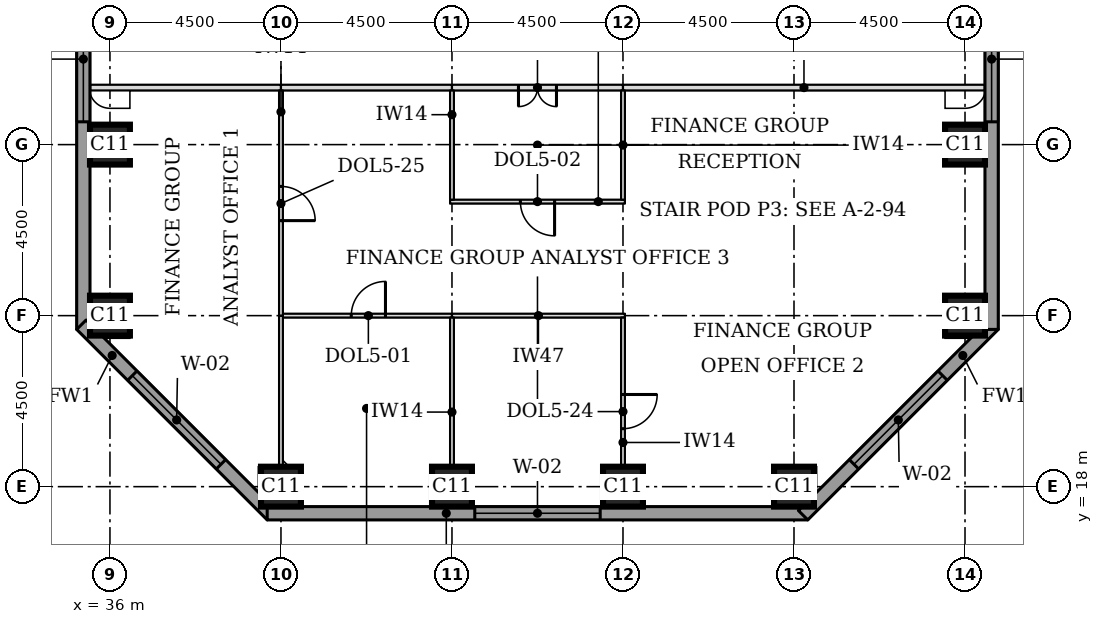
"""IFC4 building model, lengths in metres.
Left out: names, types, materials, properties, quantities, classifications, styles, units other than length and angle.
Written with IfcOpenShell. Run it as: python <this file> out.ifc"""

import sys

from ifc_helpers import new_model, si_unit, direction, frame, frame_2d, origin, origin_2d, place, context, subcontext, project, spatial, rectangle, extrude, element, fill, save


model = new_model("IFC4")
c1 = context("Model", 3, precision=1e-05, world=origin(), true_north=direction((0.0, 1.0)))
c2 = subcontext(c1, "Body", "Model", "MODEL_VIEW")
j1 = project(units=[si_unit("LENGTHUNIT", "METRE"), si_unit("PLANEANGLEUNIT", "RADIAN")], contexts=[c1])
p1 = place(None, origin())
s1 = spatial("IfcSite", under=j1, at=p1, CompositionType="ELEMENT")
p2 = place(p1, origin())
s2 = spatial("IfcBuilding", under=s1, at=p2, CompositionType="ELEMENT")
p3 = place(p2, frame((0.0, 0.0, 108.5)))
s3 = spatial("IfcBuildingStorey", under=s2, at=p3, CompositionType="ELEMENT", Elevation=108.5)
for number, where, z_axis, x_axis in (
    (1, (40.5, 18.0, 0.0), (0.0, 0.0, 1.0), (1.0, 0.0, 0.0)),
    (2, (45.0, 18.0, 0.0), (0.0, 0.0, 1.0), (1.0, 0.0, 0.0)),
    (3, (49.5, 18.0, 0.0), (0.0, 0.0, 1.0), (1.0, 0.0, 0.0)),
    (4, (54.0, 18.0, 0.0), (0.0, 0.0, 1.0), (1.0, 0.0, 0.0)),
    (5, (36.0, 22.5, 0.0), (0.0, 0.0, 1.0), (1.0, 0.0, 0.0)),
    (6, (58.5, 22.5, 0.0), (0.0, 0.0, 1.0), (1.0, 0.0, 0.0)),
    (7, (36.0, 27.0, 0.0), (0.0, 0.0, 1.0), (1.0, 0.0, 0.0)),
    (8, (58.5, 27.0, 0.0), (0.0, 0.0, 1.0), (1.0, 0.0, 0.0)),
):
    element("IfcColumn", number, at=place(p3, frame(where, z_axis=z_axis, x_axis=x_axis)), inside=s3, PredefinedType="COLUMN", context=c2, shape_type="SweptSolid", body=[
        extrude(rectangle(XDim=1.05, YDim=1.05, at=origin_2d()), origin(), (0.0, 0.0, 1.0), 3.7),
    ])
p4 = place(p3, frame((35.3, 39.975, 0.0), z_axis=(0.0, 0.0, 1.0), x_axis=(0.0, -1.0, 0.0)))
e9 = element("IfcWall", 9, at=p4, inside=s3, PredefinedType="STANDARD", context=c2, shape_type="SweptSolid", body=[
    extrude(rectangle(XDim=17.837, YDim=0.35, at=frame_2d((8.919, 0.0))), origin(), (0.0, 0.0, 1.0), 3.525),
])
p5 = place(p4, frame((0.5, 0.0, 0.9)))
e10 = element("IfcOpeningElement", 10, at=p5, cuts=e9, PredefinedType="OPENING", context=c2, shape_type="SweptSolid", body=[
    extrude(rectangle(XDim=3.3, YDim=1.9, at=frame_2d((1.65, 0.95))), frame((0.0, 0.185, 0.0), z_axis=(0.0, -1.0, 0.0), x_axis=(1.0, 0.0, 0.0)), (0.0, 0.0, 1.0), 0.37),
])
p6 = place(p4, frame((9.075, 0.0, 0.9)))
e11 = element("IfcOpeningElement", 11, at=p6, cuts=e9, PredefinedType="OPENING", context=c2, shape_type="SweptSolid", body=[
    extrude(rectangle(XDim=3.3, YDim=1.9, at=frame_2d((1.65, 0.95))), frame((0.0, 0.185, 0.0), z_axis=(0.0, -1.0, 0.0), x_axis=(1.0, 0.0, 0.0)), (0.0, 0.0, 1.0), 0.37),
])
p7 = place(p3, frame((35.249, 22.261, 0.0), z_axis=(0.0, 0.0, 1.0), x_axis=(0.707106781187, -0.707106781187, 0.0)))
e12 = element("IfcWall", 12, at=p7, inside=s3, PredefinedType="STANDARD", context=c2, shape_type="SweptSolid", body=[
    extrude(rectangle(XDim=7.089, YDim=0.35, at=frame_2d((3.544, 0.0))), origin(), (0.0, 0.0, 1.0), 3.525),
])
p8 = place(p7, frame((1.894, 0.0, 0.9)))
e13 = element("IfcOpeningElement", 13, at=p8, cuts=e12, PredefinedType="OPENING", context=c2, shape_type="SweptSolid", body=[
    extrude(rectangle(XDim=3.3, YDim=1.9, at=frame_2d((1.65, 0.95))), frame((0.0, 0.185, 0.0), z_axis=(0.0, -1.0, 0.0), x_axis=(1.0, 0.0, 0.0)), (0.0, 0.0, 1.0), 0.37),
])
p9 = place(p3, frame((40.138, 17.3, 0.0), z_axis=(0.0, 0.0, 1.0), x_axis=(1.0, 0.0, 0.0)))
e14 = element("IfcWall", 14, at=p9, inside=s3, PredefinedType="STANDARD", context=c2, shape_type="SweptSolid", body=[
    extrude(rectangle(XDim=14.225, YDim=0.35, at=frame_2d((7.112, 0.0))), origin(), (0.0, 0.0, 1.0), 3.525),
])
p10 = place(p9, frame((5.462, 0.0, 0.9)))
e15 = element("IfcOpeningElement", 15, at=p10, cuts=e14, PredefinedType="OPENING", context=c2, shape_type="SweptSolid", body=[
    extrude(rectangle(XDim=3.3, YDim=1.9, at=frame_2d((1.65, 0.95))), frame((0.0, 0.185, 0.0), z_axis=(0.0, -1.0, 0.0), x_axis=(1.0, 0.0, 0.0)), (0.0, 0.0, 1.0), 0.37),
])
p11 = place(p3, frame((54.239, 17.249, 0.0), z_axis=(0.0, 0.0, 1.0), x_axis=(0.707106781187, 0.707106781187, 0.0)))
e16 = element("IfcWall", 16, at=p11, inside=s3, PredefinedType="STANDARD", context=c2, shape_type="SweptSolid", body=[
    extrude(rectangle(XDim=7.089, YDim=0.35, at=frame_2d((3.544, 0.0))), origin(), (0.0, 0.0, 1.0), 3.525),
])
p12 = place(p11, frame((1.894, 0.0, 0.9)))
e17 = element("IfcOpeningElement", 17, at=p12, cuts=e16, PredefinedType="OPENING", context=c2, shape_type="SweptSolid", body=[
    extrude(rectangle(XDim=3.3, YDim=1.9, at=frame_2d((1.65, 0.95))), frame((0.0, 0.185, 0.0), z_axis=(0.0, -1.0, 0.0), x_axis=(1.0, 0.0, 0.0)), (0.0, 0.0, 1.0), 0.37),
])
p13 = place(p3, frame((59.2, 22.138, 0.0), z_axis=(0.0, 0.0, 1.0), x_axis=(0.0, 1.0, 0.0)))
e18 = element("IfcWall", 18, at=p13, inside=s3, PredefinedType="STANDARD", context=c2, shape_type="SweptSolid", body=[
    extrude(rectangle(XDim=17.837, YDim=0.35, at=frame_2d((8.919, 0.0))), origin(), (0.0, 0.0, 1.0), 3.525),
])
p14 = place(p13, frame((5.462, 0.0, 0.9)))
e19 = element("IfcOpeningElement", 19, at=p14, cuts=e18, PredefinedType="OPENING", context=c2, shape_type="SweptSolid", body=[
    extrude(rectangle(XDim=3.3, YDim=1.9, at=frame_2d((1.65, 0.95))), frame((0.0, 0.185, 0.0), z_axis=(0.0, -1.0, 0.0), x_axis=(1.0, 0.0, 0.0)), (0.0, 0.0, 1.0), 0.37),
])
p15 = place(p13, frame((14.037, 0.0, 0.9)))
e20 = element("IfcOpeningElement", 20, at=p15, cuts=e18, PredefinedType="OPENING", context=c2, shape_type="SweptSolid", body=[
    extrude(rectangle(XDim=3.3, YDim=1.9, at=frame_2d((1.65, 0.95))), frame((0.0, 0.185, 0.0), z_axis=(0.0, -1.0, 0.0), x_axis=(1.0, 0.0, 0.0)), (0.0, 0.0, 1.0), 0.37),
])
p16 = place(p3, frame((40.55, 22.5, 0.0), z_axis=(0.0, 0.0, 1.0), x_axis=(1.0, 0.0, 0.0)))
e21 = element("IfcWall", 21, at=p16, inside=s3, PredefinedType="PARTITIONING", context=c2, shape_type="SweptSolid", body=[
    extrude(rectangle(XDim=4.45, YDim=0.1, at=frame_2d((2.225, 0.0))), origin(), (0.0, 0.0, 1.0), 2.55),
])
p17 = place(p16, frame((1.8, 0.0, 0.0)))
e22 = element("IfcOpeningElement", 22, at=p17, cuts=e21, PredefinedType="OPENING", context=c2, shape_type="SweptSolid", body=[
    extrude(rectangle(XDim=0.9, YDim=2.1, at=frame_2d((0.45, 1.05))), frame((0.0, 0.06, 0.0), z_axis=(0.0, -1.0, 0.0), x_axis=(1.0, 0.0, 0.0)), (0.0, 0.0, 1.0), 0.12),
])
p18 = place(p3, frame((45.0, 22.5, 0.0), z_axis=(0.0, 0.0, 1.0), x_axis=(1.0, 0.0, 0.0)))
e23 = element("IfcWall", 23, at=p18, inside=s3, PredefinedType="PARTITIONING", context=c2, shape_type="SweptSolid", body=[
    extrude(rectangle(XDim=4.55, YDim=0.1, at=frame_2d((2.275, 0.0))), origin(), (0.0, 0.0, 1.0), 2.55),
])
p19 = place(p3, frame((44.95, 25.5, 0.0), z_axis=(0.0, 0.0, 1.0), x_axis=(1.0, 0.0, 0.0)))
e24 = element("IfcWall", 24, at=p19, inside=s3, PredefinedType="PARTITIONING", context=c2, shape_type="SweptSolid", body=[
    extrude(rectangle(XDim=4.6, YDim=0.1, at=frame_2d((2.3, 0.0))), origin(), (0.0, 0.0, 1.0), 3.55),
])
p20 = place(p19, frame((1.85, 0.0, 0.0)))
e25 = element("IfcOpeningElement", 25, at=p20, cuts=e24, PredefinedType="OPENING", context=c2, shape_type="SweptSolid", body=[
    extrude(rectangle(XDim=0.9, YDim=2.1, at=frame_2d((0.45, 1.05))), frame((0.0, 0.06, 0.0), z_axis=(0.0, -1.0, 0.0), x_axis=(1.0, 0.0, 0.0)), (0.0, 0.0, 1.0), 0.12),
])
p21 = place(p3, frame((35.475, 28.5, 0.0), z_axis=(0.0, 0.0, 1.0), x_axis=(1.0, 0.0, 0.0)))
e26 = element("IfcWall", 26, at=p21, inside=s3, PredefinedType="PARTITIONING", context=c2, shape_type="SweptSolid", body=[
    extrude(rectangle(XDim=5.025, YDim=0.15, at=frame_2d((2.512, 0.0))), origin(), (0.0, 0.0, 1.0), 3.55),
])
p22 = place(p3, frame((40.5, 28.5, 0.0), z_axis=(0.0, 0.0, 1.0), x_axis=(1.0, 0.0, 0.0)))
e27 = element("IfcWall", 27, at=p22, inside=s3, PredefinedType="PARTITIONING", context=c2, shape_type="SweptSolid", body=[
    extrude(rectangle(XDim=4.5, YDim=0.15, at=frame_2d((2.25, 0.0))), origin(), (0.0, 0.0, 1.0), 3.55),
])
p23 = place(p3, frame((45.0, 28.5, 0.0), z_axis=(0.0, 0.0, 1.0), x_axis=(1.0, 0.0, 0.0)))
e28 = element("IfcWall", 28, at=p23, inside=s3, PredefinedType="PARTITIONING", context=c2, shape_type="SweptSolid", body=[
    extrude(rectangle(XDim=4.5, YDim=0.15, at=frame_2d((2.25, 0.0))), origin(), (0.0, 0.0, 1.0), 3.55),
])
p24 = place(p23, frame((1.75, 0.0, 0.0)))
e29 = element("IfcOpeningElement", 29, at=p24, cuts=e28, PredefinedType="OPENING", context=c2, shape_type="SweptSolid", body=[
    extrude(rectangle(XDim=1.0, YDim=2.1, at=frame_2d((0.5, 1.05))), frame((0.0, 0.085, 0.0), z_axis=(0.0, -1.0, 0.0), x_axis=(1.0, 0.0, 0.0)), (0.0, 0.0, 1.0), 0.17),
])
p25 = place(p3, frame((49.5, 28.5, 0.0), z_axis=(0.0, 0.0, 1.0), x_axis=(1.0, 0.0, 0.0)))
e30 = element("IfcWall", 30, at=p25, inside=s3, PredefinedType="PARTITIONING", context=c2, shape_type="SweptSolid", body=[
    extrude(rectangle(XDim=9.525, YDim=0.15, at=frame_2d((4.762, 0.0))), origin(), (0.0, 0.0, 1.0), 3.55),
])
p26 = place(p3, frame((45.0, 17.475, 0.0), z_axis=(0.0, 0.0, 1.0), x_axis=(0.0, 1.0, 0.0)))
e31 = element("IfcWall", 31, at=p26, inside=s3, PredefinedType="PARTITIONING", context=c2, shape_type="SweptSolid", body=[
    extrude(rectangle(XDim=4.975, YDim=0.1, at=frame_2d((2.487, 0.0))), origin(), (0.0, 0.0, 1.0), 3.55),
])
p27 = place(p3, frame((49.5, 17.475, 0.0), z_axis=(0.0, 0.0, 1.0), x_axis=(0.0, 1.0, 0.0)))
e32 = element("IfcWall", 32, at=p27, inside=s3, PredefinedType="PARTITIONING", context=c2, shape_type="SweptSolid", body=[
    extrude(rectangle(XDim=4.975, YDim=0.1, at=frame_2d((2.487, 0.0))), origin(), (0.0, 0.0, 1.0), 3.55),
])
p28 = place(p27, frame((2.05, 0.0, 0.0)))
e33 = element("IfcOpeningElement", 33, at=p28, cuts=e32, PredefinedType="OPENING", context=c2, shape_type="SweptSolid", body=[
    extrude(rectangle(XDim=0.9, YDim=2.1, at=frame_2d((0.45, 1.05))), frame((0.0, 0.06, 0.0), z_axis=(0.0, -1.0, 0.0), x_axis=(1.0, 0.0, 0.0)), (0.0, 0.0, 1.0), 0.12),
])
p29 = place(p3, frame((40.5, 18.525, 0.0), z_axis=(0.0, 0.0, 1.0), x_axis=(0.0, 1.0, 0.0)))
e34 = element("IfcWall", 34, at=p29, inside=s3, PredefinedType="PARTITIONING", context=c2, shape_type="SweptSolid", body=[
    extrude(rectangle(XDim=3.975, YDim=0.1, at=frame_2d((1.988, 0.0))), origin(), (0.0, 0.0, 1.0), 3.55),
])
p30 = place(p3, frame((40.5, 22.5, 0.0), z_axis=(0.0, 0.0, 1.0), x_axis=(0.0, 1.0, 0.0)))
e35 = element("IfcWall", 35, at=p30, inside=s3, PredefinedType="PARTITIONING", context=c2, shape_type="SweptSolid", body=[
    extrude(rectangle(XDim=5.925, YDim=0.1, at=frame_2d((2.962, 0.0))), origin(), (0.0, 0.0, 1.0), 3.55),
])
p31 = place(p30, frame((2.5, 0.0, 0.0)))
e36 = element("IfcOpeningElement", 36, at=p31, cuts=e35, PredefinedType="OPENING", context=c2, shape_type="SweptSolid", body=[
    extrude(rectangle(XDim=0.9, YDim=2.1, at=frame_2d((0.45, 1.05))), frame((0.0, 0.06, 0.0), z_axis=(0.0, -1.0, 0.0), x_axis=(1.0, 0.0, 0.0)), (0.0, 0.0, 1.0), 0.12),
])
for number, where, z_axis, x_axis in (
    (37, (45.0, 25.55, 0.0), (0.0, 0.0, 1.0), (0.0, 1.0, 0.0)),
    (38, (49.5, 25.55, 0.0), (0.0, 0.0, 1.0), (0.0, 1.0, 0.0)),
):
    element("IfcWall", number, at=place(p3, frame(where, z_axis=z_axis, x_axis=x_axis)), inside=s3, PredefinedType="PARTITIONING", context=c2, shape_type="SweptSolid", body=[
        extrude(rectangle(XDim=2.875, YDim=0.1, at=frame_2d((1.438, 0.0))), origin(), (0.0, 0.0, 1.0), 3.55),
    ])
p32 = place(p6, origin())
e39 = element("IfcWindow", 39, at=p32, inside=s3, PartitioningType="SINGLE_PANEL", PredefinedType="WINDOW", context=c2, shape_type="SweptSolid", body=[
    extrude(rectangle(XDim=3.3, YDim=1.9, at=frame_2d((1.65, 0.95))), frame((0.0, 0.085, 0.0), z_axis=(0.0, -1.0, 0.0), x_axis=(1.0, 0.0, 0.0)), (0.0, 0.0, 1.0), 0.06),
])
fill(e11, e39)
p33 = place(p8, origin())
e40 = element("IfcWindow", 40, at=p33, inside=s3, PartitioningType="SINGLE_PANEL", PredefinedType="WINDOW", context=c2, shape_type="SweptSolid", body=[
    extrude(rectangle(XDim=3.3, YDim=1.9, at=frame_2d((1.65, 0.95))), frame((0.0, 0.085, 0.0), z_axis=(0.0, -1.0, 0.0), x_axis=(1.0, 0.0, 0.0)), (0.0, 0.0, 1.0), 0.06),
])
fill(e13, e40)
p34 = place(p10, origin())
e41 = element("IfcWindow", 41, at=p34, inside=s3, PartitioningType="SINGLE_PANEL", PredefinedType="WINDOW", context=c2, shape_type="SweptSolid", body=[
    extrude(rectangle(XDim=3.3, YDim=1.9, at=frame_2d((1.65, 0.95))), frame((0.0, 0.085, 0.0), z_axis=(0.0, -1.0, 0.0), x_axis=(1.0, 0.0, 0.0)), (0.0, 0.0, 1.0), 0.06),
])
fill(e15, e41)
p35 = place(p12, origin())
e42 = element("IfcWindow", 42, at=p35, inside=s3, PartitioningType="SINGLE_PANEL", PredefinedType="WINDOW", context=c2, shape_type="SweptSolid", body=[
    extrude(rectangle(XDim=3.3, YDim=1.9, at=frame_2d((1.65, 0.95))), frame((0.0, 0.085, 0.0), z_axis=(0.0, -1.0, 0.0), x_axis=(1.0, 0.0, 0.0)), (0.0, 0.0, 1.0), 0.06),
])
fill(e17, e42)
p36 = place(p14, origin())
e43 = element("IfcWindow", 43, at=p36, inside=s3, PartitioningType="SINGLE_PANEL", PredefinedType="WINDOW", context=c2, shape_type="SweptSolid", body=[
    extrude(rectangle(XDim=3.3, YDim=1.9, at=frame_2d((1.65, 0.95))), frame((0.0, 0.085, 0.0), z_axis=(0.0, -1.0, 0.0), x_axis=(1.0, 0.0, 0.0)), (0.0, 0.0, 1.0), 0.06),
])
fill(e19, e43)
p37 = place(p24, frame((1.0, 0.0, 0.0), z_axis=(0.0, 0.0, 1.0), x_axis=(-1.0, 0.0, 0.0)))
e44 = element("IfcDoor", 44, at=p37, inside=s3, OperationType="DOUBLE_DOOR_SINGLE_SWING", PredefinedType="DOOR", context=c2, shape_type="SweptSolid", body=[
    extrude(rectangle(XDim=1.0, YDim=2.1, at=frame_2d((0.5, 1.05))), frame((0.0, 0.025, 0.0), z_axis=(0.0, -1.0, 0.0), x_axis=(1.0, 0.0, 0.0)), (0.0, 0.0, 1.0), 0.05),
])
fill(e29, e44)
p38 = place(p20, frame((0.9, 0.0, 0.0), z_axis=(0.0, 0.0, 1.0), x_axis=(-1.0, 0.0, 0.0)))
e45 = element("IfcDoor", 45, at=p38, inside=s3, OperationType="SINGLE_SWING_LEFT", PredefinedType="DOOR", context=c2, shape_type="SweptSolid", body=[
    extrude(rectangle(XDim=0.9, YDim=2.1, at=frame_2d((0.45, 1.05))), frame((0.0, 0.025, 0.0), z_axis=(0.0, -1.0, 0.0), x_axis=(1.0, 0.0, 0.0)), (0.0, 0.0, 1.0), 0.05),
])
fill(e25, e45)
p39 = place(p31, frame((0.9, 0.0, 0.0), z_axis=(0.0, 0.0, 1.0), x_axis=(-1.0, 0.0, 0.0)))
e46 = element("IfcDoor", 46, at=p39, inside=s3, OperationType="SINGLE_SWING_RIGHT", PredefinedType="DOOR", context=c2, shape_type="SweptSolid", body=[
    extrude(rectangle(XDim=0.9, YDim=2.1, at=frame_2d((0.45, 1.05))), frame((0.0, 0.025, 0.0), z_axis=(0.0, -1.0, 0.0), x_axis=(1.0, 0.0, 0.0)), (0.0, 0.0, 1.0), 0.05),
])
fill(e36, e46)
p40 = place(p17, origin())
e47 = element("IfcDoor", 47, at=p40, inside=s3, OperationType="SINGLE_SWING_RIGHT", PredefinedType="DOOR", context=c2, shape_type="SweptSolid", body=[
    extrude(rectangle(XDim=0.9, YDim=2.1, at=frame_2d((0.45, 1.05))), frame((0.0, 0.025, 0.0), z_axis=(0.0, -1.0, 0.0), x_axis=(1.0, 0.0, 0.0)), (0.0, 0.0, 1.0), 0.05),
])
fill(e22, e47)
p41 = place(p28, frame((0.9, 0.0, 0.0), z_axis=(0.0, 0.0, 1.0), x_axis=(-1.0, 0.0, 0.0)))
e48 = element("IfcDoor", 48, at=p41, inside=s3, OperationType="SINGLE_SWING_LEFT", PredefinedType="DOOR", context=c2, shape_type="SweptSolid", body=[
    extrude(rectangle(XDim=0.9, YDim=2.1, at=frame_2d((0.45, 1.05))), frame((0.0, 0.025, 0.0), z_axis=(0.0, -1.0, 0.0), x_axis=(1.0, 0.0, 0.0)), (0.0, 0.0, 1.0), 0.05),
])
fill(e33, e48)
save(model, sys.argv[1])
